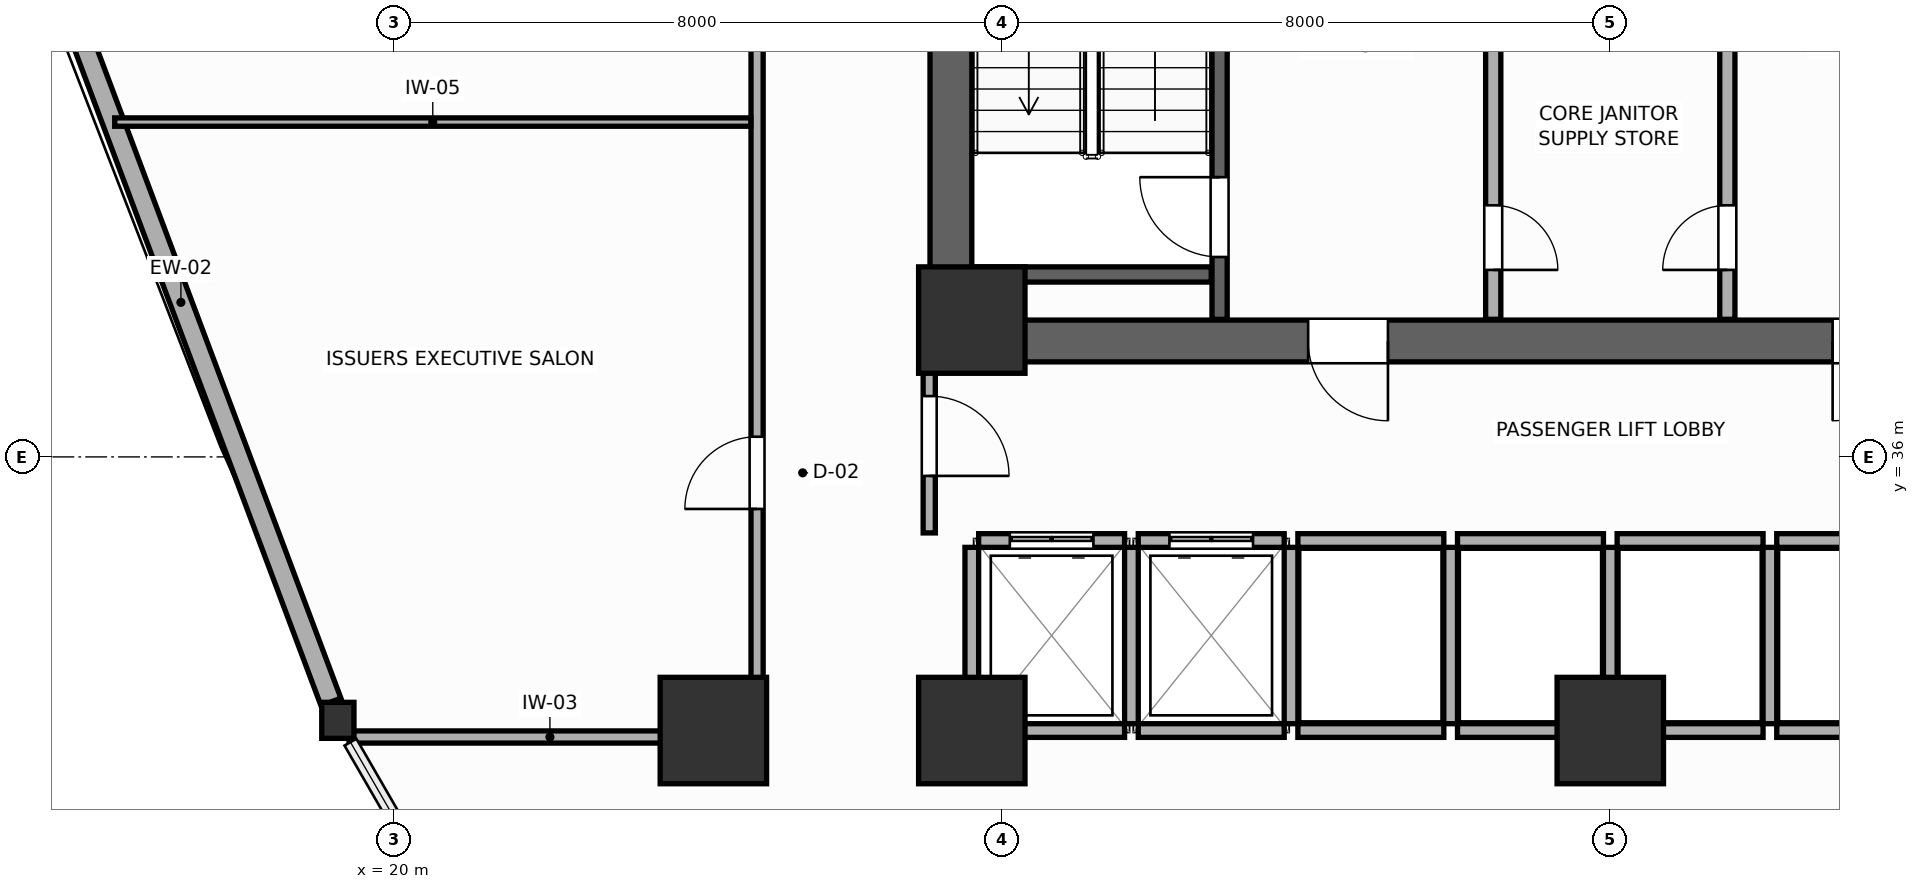
"""IFC4 building model, lengths in metres.
Left out: names, types, materials, properties, quantities, classifications, styles, units other than length and angle.
Written with IfcOpenShell. Run it as: python <this file> out.ifc"""

import sys

from ifc_helpers import new_model, si_unit, direction, frame, frame_2d, origin, origin_2d, place, context, subcontext, project, spatial, rectangle, i_section, extrude, source, transform, mapped, element, fill, save


model = new_model("IFC4")
c1 = context("Model", 3, precision=1e-05, world=origin(), true_north=direction((0.0, 1.0)))
c2 = subcontext(c1, "Body", "Model", "MODEL_VIEW")
j1 = project(units=[si_unit("LENGTHUNIT", "METRE"), si_unit("PLANEANGLEUNIT", "RADIAN")], contexts=[c1])
p1 = place(None, origin())
s1 = spatial("IfcSite", under=j1, at=p1, CompositionType="ELEMENT")
p2 = place(p1, origin())
s2 = spatial("IfcBuilding", under=s1, at=p2, CompositionType="ELEMENT")
p3 = place(p2, frame((0.0, 0.0, 75.6)))
s3 = spatial("IfcBuildingStorey", under=s2, at=p3, CompositionType="ELEMENT", Elevation=75.6)
p4 = place(p3, frame((27.05, 37.525, 0.0), z_axis=(0.0, 0.0, 1.0), x_axis=(1.0, 0.0, 0.0)))
e1 = element("IfcWall", 1, at=p4, inside=s3, PredefinedType="SHEAR", context=c2, shape_type="SweptSolid", body=[
    extrude(rectangle(XDim=17.9, YDim=0.55, at=frame_2d((8.95, 0.0))), origin(), (0.0, 0.0, 1.0), 3.9),
])
p5 = place(p4, frame((4.975, 0.0, 0.0)))
e2 = element("IfcOpeningElement", 2, at=p5, cuts=e1, PredefinedType="OPENING", context=c2, shape_type="SweptSolid", body=[
    extrude(rectangle(XDim=1.05, YDim=2.1, at=frame_2d((0.525, 1.05))), frame((0.0, 0.285, 0.0), z_axis=(0.0, -1.0, 0.0), x_axis=(1.0, 0.0, 0.0)), (0.0, 0.0, 1.0), 0.57),
])
p6 = place(p4, frame((11.875, 0.0, 0.0)))
e3 = element("IfcOpeningElement", 3, at=p6, cuts=e1, PredefinedType="OPENING", context=c2, shape_type="SweptSolid", body=[
    extrude(rectangle(XDim=1.05, YDim=2.1, at=frame_2d((0.525, 1.05))), frame((0.0, 0.285, 0.0), z_axis=(0.0, -1.0, 0.0), x_axis=(1.0, 0.0, 0.0)), (0.0, 0.0, 1.0), 0.57),
])
p7 = place(p3, frame((27.325, 37.8, 0.0), z_axis=(0.0, 0.0, 1.0), x_axis=(0.0, 1.0, 0.0)))
e4 = element("IfcWall", 4, at=p7, inside=s3, PredefinedType="SHEAR", context=c2, shape_type="SweptSolid", body=[
    extrude(rectangle(XDim=9.0, YDim=0.55, at=frame_2d((4.5, 0.0))), origin(), (0.0, 0.0, 1.0), 3.9),
])
m1 = source(origin(), c2, "Body", "SweptSolid", [
    extrude(rectangle(XDim=1.4, YDim=1.4, at=origin_2d()), origin(), (0.0, 0.0, 1.0), 3.9),
])
for number, where, z_axis, x_axis in (
    (5, (27.6, 37.8, 0.0), (0.0, 0.0, 1.0), (1.0, 0.0, 0.0)),
    (6, (27.6, 32.4, 0.0), (0.0, 0.0, 1.0), (1.0, 0.0, 0.0)),
    (7, (36.0, 32.4, 0.0), (0.0, 0.0, 1.0), (1.0, 0.0, 0.0)),
    (8, (24.2, 32.4, 0.0), (0.0, 0.0, 1.0), (1.0, 0.0, 0.0)),
):
    element("IfcColumn", number, at=place(p3, frame(where, z_axis=z_axis, x_axis=x_axis)), inside=s3, PredefinedType="COLUMN", context=c2, shape_type="MappedRepresentation", body=[
        mapped(m1, transform((0.0, 0.0, 0.0), scale=1.0)),
    ])
m2 = source(origin(), c2, "Body", "SweptSolid", [
    extrude(i_section(OverallWidth=0.424, OverallDepth=0.474, WebThickness=0.045, FlangeThickness=0.072, FilletRadius=0.015, at=origin_2d()), origin(), (0.0, 0.0, 1.0), 3.9),
])
p8 = place(p3, frame((19.26, 32.534, 0.0), z_axis=(0.0, 0.0, 1.0), x_axis=(1.0, 0.0, 0.0)))
e9 = element("IfcColumn", 9, at=p8, inside=s3, PredefinedType="COLUMN", context=c2, shape_type="MappedRepresentation", body=[
    mapped(m2, transform((0.0, 0.0, 0.0), scale=1.0)),
])
p9 = place(p3, frame((13.129, 48.86, 0.0), z_axis=(0.0, 0.0, 1.0), x_axis=(0.351559441404, -0.936165561832, 0.0)))
e10 = element("IfcWall", 10, at=p9, inside=s3, PredefinedType="SOLIDWALL", context=c2, shape_type="SweptSolid", body=[
    extrude(rectangle(XDim=17.181, YDim=0.28, at=frame_2d((8.59, 0.0))), origin(), (0.0, 0.0, 1.0), 3.23),
])
p10 = place(p9, frame((4.07, 0.0, 0.75)))
e11 = element("IfcOpeningElement", 11, at=p10, cuts=e10, PredefinedType="OPENING", context=c2, shape_type="SweptSolid", body=[
    extrude(rectangle(XDim=1.7, YDim=1.75, at=frame_2d((0.85, 0.875))), frame((0.0, 0.15, 0.0), z_axis=(0.0, -1.0, 0.0), x_axis=(1.0, 0.0, 0.0)), (0.0, 0.0, 1.0), 0.3),
])
p11 = place(p3, frame((30.86, 37.81, 0.0), z_axis=(0.0, 0.0, 1.0), x_axis=(0.0, 1.0, 0.0)))
e12 = element("IfcWall", 12, at=p11, inside=s3, PredefinedType="SHEAR", context=c2, shape_type="SweptSolid", body=[
    extrude(rectangle(XDim=8.98, YDim=0.2, at=frame_2d((4.49, 0.0))), origin(), (0.0, 0.0, 1.0), 3.9),
])
p12 = place(p11, frame((0.82, 0.0, 0.0)))
e13 = element("IfcOpeningElement", 13, at=p12, cuts=e12, PredefinedType="OPENING", context=c2, shape_type="SweptSolid", body=[
    extrude(rectangle(XDim=1.05, YDim=2.1, at=frame_2d((0.525, 1.05))), frame((0.0, 0.11, 0.0), z_axis=(0.0, -1.0, 0.0), x_axis=(1.0, 0.0, 0.0)), (0.0, 0.0, 1.0), 0.22),
])
p13 = place(p3, frame((27.61, 38.4, 0.0), z_axis=(0.0, 0.0, 1.0), x_axis=(1.0, 0.0, 0.0)))
e14 = element("IfcWall", 14, at=p13, inside=s3, PredefinedType="SHEAR", context=c2, shape_type="SweptSolid", body=[
    extrude(rectangle(XDim=3.14, YDim=0.2, at=frame_2d((1.57, 0.0))), origin(), (0.0, 0.0, 1.0), 3.9),
])
p14 = place(p3, frame((34.46, 37.81, 0.0), z_axis=(0.0, 0.0, 1.0), x_axis=(0.0, 1.0, 0.0)))
e15 = element("IfcWall", 15, at=p14, inside=s3, PredefinedType="PARTITIONING", context=c2, shape_type="SweptSolid", body=[
    extrude(rectangle(XDim=8.98, YDim=0.2, at=frame_2d((4.49, 0.0))), origin(), (0.0, 0.0, 1.0), 3.68),
])
p15 = place(p14, frame((0.65, 0.0, 0.0)))
e16 = element("IfcOpeningElement", 16, at=p15, cuts=e15, PredefinedType="OPENING", context=c2, shape_type="SweptSolid", body=[
    extrude(rectangle(XDim=0.85, YDim=2.05, at=frame_2d((0.425, 1.025))), frame((0.0, 0.11, 0.0), z_axis=(0.0, -1.0, 0.0), x_axis=(1.0, 0.0, 0.0)), (0.0, 0.0, 1.0), 0.22),
])
p16 = place(p3, frame((37.54, 37.81, 0.0), z_axis=(0.0, 0.0, 1.0), x_axis=(0.0, 1.0, 0.0)))
e17 = element("IfcWall", 17, at=p16, inside=s3, PredefinedType="PARTITIONING", context=c2, shape_type="SweptSolid", body=[
    extrude(rectangle(XDim=8.98, YDim=0.2, at=frame_2d((4.49, 0.0))), origin(), (0.0, 0.0, 1.0), 3.68),
])
p17 = place(p16, frame((0.65, 0.0, 0.0)))
e18 = element("IfcOpeningElement", 18, at=p17, cuts=e17, PredefinedType="OPENING", context=c2, shape_type="SweptSolid", body=[
    extrude(rectangle(XDim=0.85, YDim=2.05, at=frame_2d((0.425, 1.025))), frame((0.0, 0.11, 0.0), z_axis=(0.0, -1.0, 0.0), x_axis=(1.0, 0.0, 0.0)), (0.0, 0.0, 1.0), 0.22),
])
p18 = place(p3, frame((27.69, 34.9, 0.0), z_axis=(0.0, 0.0, 1.0), x_axis=(1.0, 0.0, 0.0)))
e19 = element("IfcWall", 19, at=p18, inside=s3, PredefinedType="PARTITIONING", context=c2, shape_type="SweptSolid", body=[
    extrude(rectangle(XDim=1.92, YDim=0.18, at=frame_2d((0.96, 0.0))), origin(), (0.0, 0.0, 1.0), 3.68),
])
p19 = place(p18, frame((0.41, 0.0, 0.0)))
e20 = element("IfcOpeningElement", 20, at=p19, cuts=e19, PredefinedType="OPENING", context=c2, shape_type="SweptSolid", body=[
    extrude(rectangle(XDim=1.1, YDim=2.1, at=frame_2d((0.55, 1.05))), frame((0.0, 0.1, 0.0), z_axis=(0.0, -1.0, 0.0), x_axis=(1.0, 0.0, 0.0)), (0.0, 0.0, 1.0), 0.2),
])
p20 = place(p3, frame((27.69, 32.4, 0.0), z_axis=(0.0, 0.0, 1.0), x_axis=(1.0, 0.0, 0.0)))
e21 = element("IfcWall", 21, at=p20, inside=s3, PredefinedType="PARTITIONING", context=c2, shape_type="SweptSolid", body=[
    extrude(rectangle(XDim=1.92, YDim=0.18, at=frame_2d((0.96, 0.0))), origin(), (0.0, 0.0, 1.0), 3.18),
])
p21 = place(p3, frame((27.6, 32.49, 0.0), z_axis=(0.0, 0.0, 1.0), x_axis=(0.0, 1.0, 0.0)))
e22 = element("IfcWall", 22, at=p21, inside=s3, PredefinedType="PARTITIONING", context=c2, shape_type="SweptSolid", body=[
    extrude(rectangle(XDim=2.32, YDim=0.18, at=frame_2d((1.16, 0.0))), origin(), (0.0, 0.0, 1.0), 3.68),
])
p22 = place(p3, frame((29.79, 34.9, 0.0), z_axis=(0.0, 0.0, 1.0), x_axis=(1.0, 0.0, 0.0)))
e23 = element("IfcWall", 23, at=p22, inside=s3, PredefinedType="PARTITIONING", context=c2, shape_type="SweptSolid", body=[
    extrude(rectangle(XDim=1.92, YDim=0.18, at=frame_2d((0.96, 0.0))), origin(), (0.0, 0.0, 1.0), 3.68),
])
p23 = place(p22, frame((0.41, 0.0, 0.0)))
e24 = element("IfcOpeningElement", 24, at=p23, cuts=e23, PredefinedType="OPENING", context=c2, shape_type="SweptSolid", body=[
    extrude(rectangle(XDim=1.1, YDim=2.1, at=frame_2d((0.55, 1.05))), frame((0.0, 0.1, 0.0), z_axis=(0.0, -1.0, 0.0), x_axis=(1.0, 0.0, 0.0)), (0.0, 0.0, 1.0), 0.2),
])
p24 = place(p3, frame((29.79, 32.4, 0.0), z_axis=(0.0, 0.0, 1.0), x_axis=(1.0, 0.0, 0.0)))
e25 = element("IfcWall", 25, at=p24, inside=s3, PredefinedType="PARTITIONING", context=c2, shape_type="SweptSolid", body=[
    extrude(rectangle(XDim=1.92, YDim=0.18, at=frame_2d((0.96, 0.0))), origin(), (0.0, 0.0, 1.0), 3.18),
])
p25 = place(p3, frame((29.7, 32.49, 0.0), z_axis=(0.0, 0.0, 1.0), x_axis=(0.0, 1.0, 0.0)))
e26 = element("IfcWall", 26, at=p25, inside=s3, PredefinedType="PARTITIONING", context=c2, shape_type="SweptSolid", body=[
    extrude(rectangle(XDim=2.32, YDim=0.18, at=frame_2d((1.16, 0.0))), origin(), (0.0, 0.0, 1.0), 3.68),
])
p26 = place(p3, frame((31.89, 34.9, 0.0), z_axis=(0.0, 0.0, 1.0), x_axis=(1.0, 0.0, 0.0)))
e27 = element("IfcWall", 27, at=p26, inside=s3, PredefinedType="PARTITIONING", context=c2, shape_type="SweptSolid", body=[
    extrude(rectangle(XDim=1.92, YDim=0.18, at=frame_2d((0.96, 0.0))), origin(), (0.0, 0.0, 1.0), 3.68),
])
p27 = place(p3, frame((31.89, 32.4, 0.0), z_axis=(0.0, 0.0, 1.0), x_axis=(1.0, 0.0, 0.0)))
e28 = element("IfcWall", 28, at=p27, inside=s3, PredefinedType="PARTITIONING", context=c2, shape_type="SweptSolid", body=[
    extrude(rectangle(XDim=1.92, YDim=0.18, at=frame_2d((0.96, 0.0))), origin(), (0.0, 0.0, 1.0), 3.18),
])
p28 = place(p3, frame((31.8, 32.49, 0.0), z_axis=(0.0, 0.0, 1.0), x_axis=(0.0, 1.0, 0.0)))
e29 = element("IfcWall", 29, at=p28, inside=s3, PredefinedType="PARTITIONING", context=c2, shape_type="SweptSolid", body=[
    extrude(rectangle(XDim=2.32, YDim=0.18, at=frame_2d((1.16, 0.0))), origin(), (0.0, 0.0, 1.0), 3.68),
])
p29 = place(p3, frame((33.99, 34.9, 0.0), z_axis=(0.0, 0.0, 1.0), x_axis=(1.0, 0.0, 0.0)))
e30 = element("IfcWall", 30, at=p29, inside=s3, PredefinedType="PARTITIONING", context=c2, shape_type="SweptSolid", body=[
    extrude(rectangle(XDim=1.92, YDim=0.18, at=frame_2d((0.96, 0.0))), origin(), (0.0, 0.0, 1.0), 3.68),
])
p30 = place(p3, frame((33.99, 32.4, 0.0), z_axis=(0.0, 0.0, 1.0), x_axis=(1.0, 0.0, 0.0)))
e31 = element("IfcWall", 31, at=p30, inside=s3, PredefinedType="PARTITIONING", context=c2, shape_type="SweptSolid", body=[
    extrude(rectangle(XDim=1.92, YDim=0.18, at=frame_2d((0.96, 0.0))), origin(), (0.0, 0.0, 1.0), 3.18),
])
p31 = place(p3, frame((33.9, 32.49, 0.0), z_axis=(0.0, 0.0, 1.0), x_axis=(0.0, 1.0, 0.0)))
e32 = element("IfcWall", 32, at=p31, inside=s3, PredefinedType="PARTITIONING", context=c2, shape_type="SweptSolid", body=[
    extrude(rectangle(XDim=2.32, YDim=0.18, at=frame_2d((1.16, 0.0))), origin(), (0.0, 0.0, 1.0), 3.68),
])
p32 = place(p3, frame((36.09, 34.9, 0.0), z_axis=(0.0, 0.0, 1.0), x_axis=(1.0, 0.0, 0.0)))
e33 = element("IfcWall", 33, at=p32, inside=s3, PredefinedType="PARTITIONING", context=c2, shape_type="SweptSolid", body=[
    extrude(rectangle(XDim=1.92, YDim=0.18, at=frame_2d((0.96, 0.0))), origin(), (0.0, 0.0, 1.0), 3.68),
])
p33 = place(p3, frame((36.09, 32.4, 0.0), z_axis=(0.0, 0.0, 1.0), x_axis=(1.0, 0.0, 0.0)))
e34 = element("IfcWall", 34, at=p33, inside=s3, PredefinedType="PARTITIONING", context=c2, shape_type="SweptSolid", body=[
    extrude(rectangle(XDim=1.92, YDim=0.18, at=frame_2d((0.96, 0.0))), origin(), (0.0, 0.0, 1.0), 3.18),
])
p34 = place(p3, frame((36.0, 32.49, 0.0), z_axis=(0.0, 0.0, 1.0), x_axis=(0.0, 1.0, 0.0)))
e35 = element("IfcWall", 35, at=p34, inside=s3, PredefinedType="PARTITIONING", context=c2, shape_type="SweptSolid", body=[
    extrude(rectangle(XDim=2.32, YDim=0.18, at=frame_2d((1.16, 0.0))), origin(), (0.0, 0.0, 1.0), 3.68),
])
p35 = place(p3, frame((38.19, 34.9, 0.0), z_axis=(0.0, 0.0, 1.0), x_axis=(1.0, 0.0, 0.0)))
e36 = element("IfcWall", 36, at=p35, inside=s3, PredefinedType="PARTITIONING", context=c2, shape_type="SweptSolid", body=[
    extrude(rectangle(XDim=1.92, YDim=0.18, at=frame_2d((0.96, 0.0))), origin(), (0.0, 0.0, 1.0), 3.68),
])
p36 = place(p3, frame((38.19, 32.4, 0.0), z_axis=(0.0, 0.0, 1.0), x_axis=(1.0, 0.0, 0.0)))
e37 = element("IfcWall", 37, at=p36, inside=s3, PredefinedType="PARTITIONING", context=c2, shape_type="SweptSolid", body=[
    extrude(rectangle(XDim=1.92, YDim=0.18, at=frame_2d((0.96, 0.0))), origin(), (0.0, 0.0, 1.0), 3.18),
])
p37 = place(p3, frame((38.1, 32.49, 0.0), z_axis=(0.0, 0.0, 1.0), x_axis=(0.0, 1.0, 0.0)))
e38 = element("IfcWall", 38, at=p37, inside=s3, PredefinedType="PARTITIONING", context=c2, shape_type="SweptSolid", body=[
    extrude(rectangle(XDim=2.32, YDim=0.18, at=frame_2d((1.16, 0.0))), origin(), (0.0, 0.0, 1.0), 3.68),
])
p38 = place(p3, frame((27.04, 35.0, 0.0), z_axis=(0.0, 0.0, 1.0), x_axis=(0.0, 1.0, 0.0)))
e39 = element("IfcWall", 39, at=p38, inside=s3, PredefinedType="PARTITIONING", context=c2, shape_type="SweptSolid", body=[
    extrude(rectangle(XDim=2.65, YDim=0.16, at=frame_2d((1.325, 0.0))), origin(), (0.0, 0.0, 1.0), 3.68),
])
p39 = place(p38, frame((0.75, 0.0, 0.0)))
e40 = element("IfcOpeningElement", 40, at=p39, cuts=e39, PredefinedType="OPENING", context=c2, shape_type="SweptSolid", body=[
    extrude(rectangle(XDim=1.05, YDim=2.1, at=frame_2d((0.525, 1.05))), frame((0.0, 0.09, 0.0), z_axis=(0.0, -1.0, 0.0), x_axis=(1.0, 0.0, 0.0)), (0.0, 0.0, 1.0), 0.18),
])
p40 = place(p3, frame((24.775, 32.31, 0.0), z_axis=(0.0, 0.0, 1.0), x_axis=(0.0, 1.0, 0.0)))
e41 = element("IfcWall", 41, at=p40, inside=s3, PredefinedType="PARTITIONING", context=c2, shape_type="SweptSolid", body=[
    extrude(rectangle(XDim=22.218, YDim=0.16, at=frame_2d((11.109, 0.0))), origin(), (0.0, 0.0, 1.0), 3.68),
])
p41 = place(p40, frame((3.005, 0.0, 0.0)))
e42 = element("IfcOpeningElement", 42, at=p41, cuts=e41, PredefinedType="OPENING", context=c2, shape_type="SweptSolid", body=[
    extrude(rectangle(XDim=0.95, YDim=2.05, at=frame_2d((0.475, 1.025))), frame((0.0, 0.09, 0.0), z_axis=(0.0, -1.0, 0.0), x_axis=(1.0, 0.0, 0.0)), (0.0, 0.0, 1.0), 0.18),
])
p42 = place(p40, frame((11.516, 0.0, 0.0)))
e43 = element("IfcOpeningElement", 43, at=p42, cuts=e41, PredefinedType="OPENING", context=c2, shape_type="SweptSolid", body=[
    extrude(rectangle(XDim=0.95, YDim=2.05, at=frame_2d((0.475, 1.025))), frame((0.0, 0.09, 0.0), z_axis=(0.0, -1.0, 0.0), x_axis=(1.0, 0.0, 0.0)), (0.0, 0.0, 1.0), 0.18),
])
p43 = place(p3, frame((19.406, 32.315, 0.0), z_axis=(0.0, 0.0, 1.0), x_axis=(1.0, 0.0, 0.0)))
e44 = element("IfcWall", 44, at=p43, inside=s3, PredefinedType="PARTITIONING", context=c2, shape_type="SweptSolid", body=[
    extrude(rectangle(XDim=5.287, YDim=0.16, at=frame_2d((2.644, 0.0))), origin(), (0.0, 0.0, 1.0), 3.18),
])
p44 = place(p3, frame((16.324, 40.405, 0.0), z_axis=(0.0, 0.0, 1.0), x_axis=(1.0, 0.0, 0.0)))
e45 = element("IfcWall", 45, at=p44, inside=s3, PredefinedType="MOVABLE", context=c2, shape_type="SweptSolid", body=[
    extrude(rectangle(XDim=8.369, YDim=0.11, at=frame_2d((4.185, 0.0))), origin(), (0.0, 0.0, 1.0), 3.68),
])
p45 = place(p12, origin())
e46 = element("IfcDoor", 46, at=p45, inside=s3, OperationType="SINGLE_SWING_RIGHT", PredefinedType="DOOR", context=c2, shape_type="SweptSolid", body=[
    extrude(rectangle(XDim=1.05, YDim=2.1, at=frame_2d((0.525, 1.05))), frame((0.0, 0.025, 0.0), z_axis=(0.0, -1.0, 0.0), x_axis=(1.0, 0.0, 0.0)), (0.0, 0.0, 1.0), 0.05),
])
fill(e13, e46)
p46 = place(p15, frame((0.85, 0.0, 0.0), z_axis=(0.0, 0.0, 1.0), x_axis=(-1.0, 0.0, 0.0)))
e47 = element("IfcDoor", 47, at=p46, inside=s3, OperationType="SINGLE_SWING_RIGHT", PredefinedType="DOOR", context=c2, shape_type="SweptSolid", body=[
    extrude(rectangle(XDim=0.85, YDim=2.05, at=frame_2d((0.425, 1.025))), frame((0.0, 0.025, 0.0), z_axis=(0.0, -1.0, 0.0), x_axis=(1.0, 0.0, 0.0)), (0.0, 0.0, 1.0), 0.05),
])
fill(e16, e47)
p47 = place(p17, origin())
e48 = element("IfcDoor", 48, at=p47, inside=s3, OperationType="SINGLE_SWING_LEFT", PredefinedType="DOOR", context=c2, shape_type="SweptSolid", body=[
    extrude(rectangle(XDim=0.85, YDim=2.05, at=frame_2d((0.425, 1.025))), frame((0.0, 0.025, 0.0), z_axis=(0.0, -1.0, 0.0), x_axis=(1.0, 0.0, 0.0)), (0.0, 0.0, 1.0), 0.05),
])
fill(e18, e48)
p48 = place(p19, origin())
e49 = element("IfcDoor", 49, at=p48, inside=s3, OperationType="DOUBLE_DOOR_SLIDING", PredefinedType="DOOR", context=c2, shape_type="SweptSolid", body=[
    extrude(rectangle(XDim=1.1, YDim=2.1, at=frame_2d((0.55, 1.05))), frame((0.0, 0.025, 0.0), z_axis=(0.0, -1.0, 0.0), x_axis=(1.0, 0.0, 0.0)), (0.0, 0.0, 1.0), 0.05),
])
fill(e20, e49)
p49 = place(p23, origin())
e50 = element("IfcDoor", 50, at=p49, inside=s3, OperationType="DOUBLE_DOOR_SLIDING", PredefinedType="DOOR", context=c2, shape_type="SweptSolid", body=[
    extrude(rectangle(XDim=1.1, YDim=2.1, at=frame_2d((0.55, 1.05))), frame((0.0, 0.025, 0.0), z_axis=(0.0, -1.0, 0.0), x_axis=(1.0, 0.0, 0.0)), (0.0, 0.0, 1.0), 0.05),
])
fill(e24, e50)
p50 = place(p39, frame((1.05, 0.0, 0.0), z_axis=(0.0, 0.0, 1.0), x_axis=(-1.0, 0.0, 0.0)))
e51 = element("IfcDoor", 51, at=p50, inside=s3, OperationType="SINGLE_SWING_RIGHT", PredefinedType="DOOR", context=c2, shape_type="SweptSolid", body=[
    extrude(rectangle(XDim=1.05, YDim=2.1, at=frame_2d((0.525, 1.05))), frame((0.0, 0.025, 0.0), z_axis=(0.0, -1.0, 0.0), x_axis=(1.0, 0.0, 0.0)), (0.0, 0.0, 1.0), 0.05),
])
fill(e40, e51)
p51 = place(p41, origin())
e52 = element("IfcDoor", 52, at=p51, inside=s3, OperationType="SINGLE_SWING_LEFT", PredefinedType="DOOR", context=c2, shape_type="SweptSolid", body=[
    extrude(rectangle(XDim=0.95, YDim=2.05, at=frame_2d((0.475, 1.025))), frame((0.0, 0.025, 0.0), z_axis=(0.0, -1.0, 0.0), x_axis=(1.0, 0.0, 0.0)), (0.0, 0.0, 1.0), 0.05),
])
fill(e42, e52)
p52 = place(p5, frame((1.05, 0.0, 0.0), z_axis=(0.0, 0.0, 1.0), x_axis=(-1.0, 0.0, 0.0)))
e53 = element("IfcDoor", 53, at=p52, inside=s3, OperationType="SINGLE_SWING_LEFT", PredefinedType="DOOR", context=c2, shape_type="SweptSolid", body=[
    extrude(rectangle(XDim=1.05, YDim=2.1, at=frame_2d((0.525, 1.05))), frame((0.0, 0.025, 0.0), z_axis=(0.0, -1.0, 0.0), x_axis=(1.0, 0.0, 0.0)), (0.0, 0.0, 1.0), 0.05),
])
fill(e2, e53)
p53 = place(p6, frame((1.05, 0.0, 0.0), z_axis=(0.0, 0.0, 1.0), x_axis=(-1.0, 0.0, 0.0)))
e54 = element("IfcDoor", 54, at=p53, inside=s3, OperationType="SINGLE_SWING_RIGHT", PredefinedType="DOOR", context=c2, shape_type="SweptSolid", body=[
    extrude(rectangle(XDim=1.05, YDim=2.1, at=frame_2d((0.525, 1.05))), frame((0.0, 0.025, 0.0), z_axis=(0.0, -1.0, 0.0), x_axis=(1.0, 0.0, 0.0)), (0.0, 0.0, 1.0), 0.05),
])
fill(e3, e54)
save(model, sys.argv[1])
